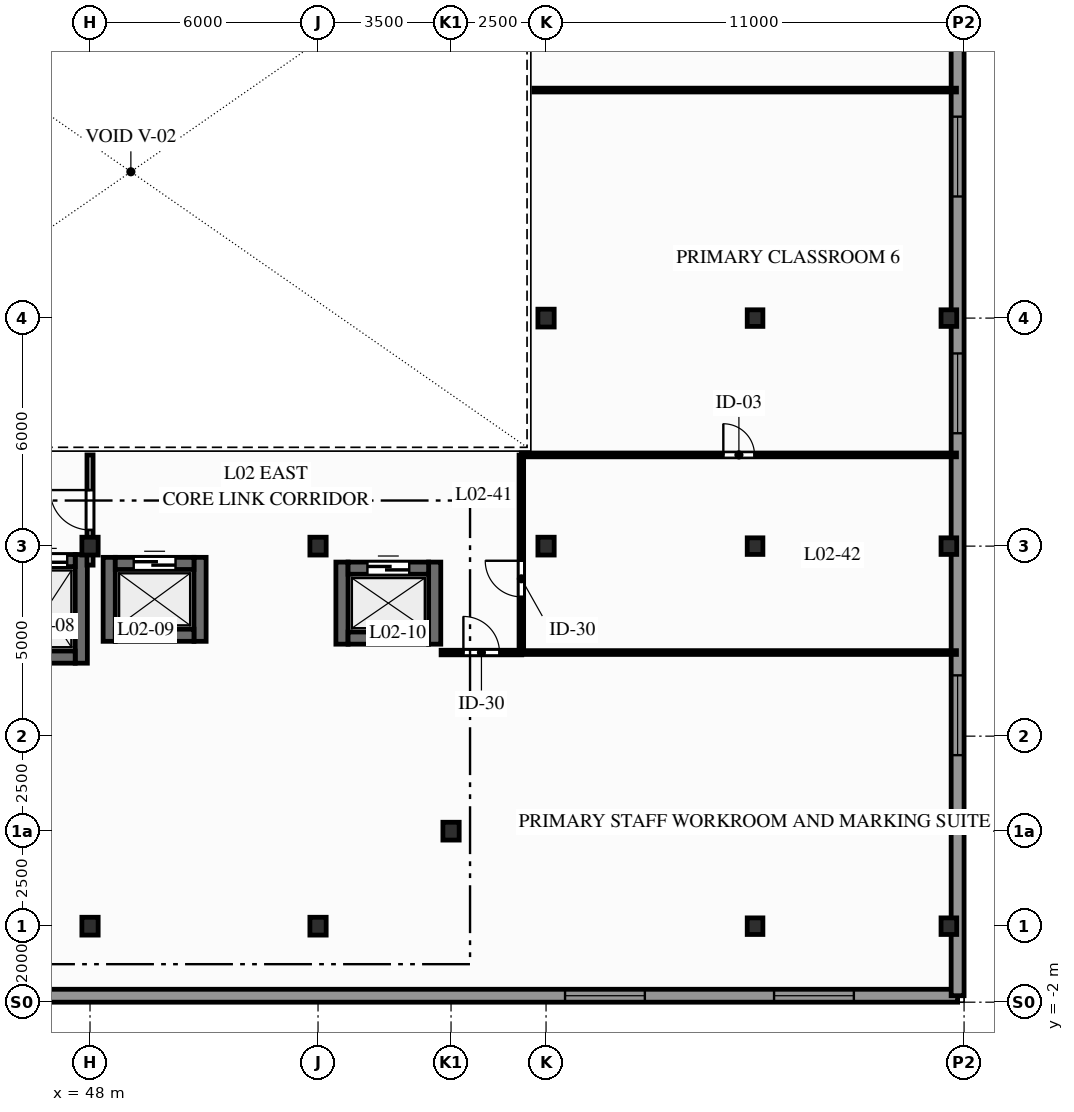
"""IFC4 building model, lengths in metres.
Left out: names, types, materials, properties, quantities, classifications, styles, units other than length and angle.
Written with IfcOpenShell. Run it as: python <this file> out.ifc"""

import sys

from ifc_helpers import new_model, si_unit, direction, frame, frame_2d, origin, origin_2d, place, context, subcontext, project, spatial, rectangle, i_section, extrude, element, fill, save


model = new_model("IFC4")
c1 = context("Model", 3, precision=1e-05, world=origin(), true_north=direction((0.0, 1.0)))
c2 = subcontext(c1, "Body", "Model", "MODEL_VIEW")
j1 = project(units=[si_unit("LENGTHUNIT", "METRE"), si_unit("PLANEANGLEUNIT", "RADIAN")], contexts=[c1])
p1 = place(None, origin())
s1 = spatial("IfcSite", under=j1, at=p1, CompositionType="ELEMENT")
p2 = place(p1, origin())
s2 = spatial("IfcBuilding", under=s1, at=p2, CompositionType="ELEMENT")
p3 = place(p2, frame((0.0, 0.0, 9.0)))
s3 = spatial("IfcBuildingStorey", under=s2, at=p3, CompositionType="ELEMENT", Elevation=9.0)
for number, where, z_axis, x_axis in (
    (1, (48.0, 0.0, 0.0), (0.0, 0.0, 1.0), (1.0, 0.0, 0.0)),
    (2, (48.0, 10.0, 0.0), (0.0, 0.0, 1.0), (1.0, 0.0, 0.0)),
    (3, (54.0, 0.0, 0.0), (0.0, 0.0, 1.0), (1.0, 0.0, 0.0)),
    (4, (54.0, 10.0, 0.0), (0.0, 0.0, 1.0), (1.0, 0.0, 0.0)),
    (5, (57.5, 2.5, 0.0), (0.0, 0.0, 1.0), (1.0, 0.0, 0.0)),
    (6, (60.0, 10.0, 0.0), (0.0, 0.0, 1.0), (1.0, 0.0, 0.0)),
    (7, (60.0, 16.0, 0.0), (0.0, 0.0, 1.0), (1.0, 0.0, 0.0)),
):
    element("IfcColumn", number, at=place(p3, frame(where, z_axis=z_axis, x_axis=x_axis)), inside=s3, PredefinedType="COLUMN", context=c2, shape_type="SweptSolid", body=[
        extrude(i_section(OverallWidth=0.428, OverallDepth=0.469, WebThickness=0.078, FlangeThickness=0.125, FilletRadius=0.015, at=origin_2d()), origin(), (0.0, 0.0, 1.0), 4.5),
    ])
for number, where, z_axis, x_axis in (
    (8, (65.5, 0.0, 0.0), (0.0, 0.0, 1.0), (1.0, 0.0, 0.0)),
    (9, (65.5, 10.0, 0.0), (0.0, 0.0, 1.0), (1.0, 0.0, 0.0)),
    (10, (65.5, 16.0, 0.0), (0.0, 0.0, 1.0), (1.0, 0.0, 0.0)),
    (11, (70.6, 0.0, 0.0), (0.0, 0.0, 1.0), (1.0, 0.0, 0.0)),
    (12, (70.6, 10.0, 0.0), (0.0, 0.0, 1.0), (1.0, 0.0, 0.0)),
    (13, (70.6, 16.0, 0.0), (0.0, 0.0, 1.0), (1.0, 0.0, 0.0)),
):
    element("IfcColumn", number, at=place(p3, frame(where, z_axis=z_axis, x_axis=x_axis)), inside=s3, PredefinedType="COLUMN", context=c2, shape_type="SweptSolid", body=[
        extrude(i_section(OverallWidth=0.412, OverallDepth=0.437, WebThickness=0.036, FlangeThickness=0.058, FilletRadius=0.015, at=origin_2d()), origin(), (0.0, 0.0, 1.0), 4.5),
    ])
p4 = place(p3, frame((-10.83, -1.83, 0.0), z_axis=(0.0, 0.0, 1.0), x_axis=(1.0, 0.0, 0.0)))
e14 = element("IfcWall", 14, at=p4, inside=s3, PredefinedType="STANDARD", context=c2, shape_type="SweptSolid", body=[
    extrude(rectangle(XDim=81.66, YDim=0.34, at=frame_2d((40.83, 0.0))), origin(), (0.0, 0.0, 1.0), 4.22),
])
p5 = place(p4, frame((2.83, 0.0, 0.9)))
e15 = element("IfcOpeningElement", 15, at=p5, cuts=e14, PredefinedType="OPENING", context=c2, shape_type="SweptSolid", body=[
    extrude(rectangle(XDim=2.1, YDim=2.05, at=frame_2d((1.05, 1.025))), frame((0.0, 0.18, 0.0), z_axis=(0.0, -1.0, 0.0), x_axis=(1.0, 0.0, 0.0)), (0.0, 0.0, 1.0), 0.36),
])
p6 = place(p4, frame((8.33, 0.0, 0.9)))
e16 = element("IfcOpeningElement", 16, at=p6, cuts=e14, PredefinedType="OPENING", context=c2, shape_type="SweptSolid", body=[
    extrude(rectangle(XDim=2.1, YDim=2.05, at=frame_2d((1.05, 1.025))), frame((0.0, 0.18, 0.0), z_axis=(0.0, -1.0, 0.0), x_axis=(1.0, 0.0, 0.0)), (0.0, 0.0, 1.0), 0.36),
])
p7 = place(p4, frame((71.33, 0.0, 0.9)))
e17 = element("IfcOpeningElement", 17, at=p7, cuts=e14, PredefinedType="OPENING", context=c2, shape_type="SweptSolid", body=[
    extrude(rectangle(XDim=2.1, YDim=2.05, at=frame_2d((1.05, 1.025))), frame((0.0, 0.18, 0.0), z_axis=(0.0, -1.0, 0.0), x_axis=(1.0, 0.0, 0.0)), (0.0, 0.0, 1.0), 0.36),
])
p8 = place(p4, frame((76.83, 0.0, 0.9)))
e18 = element("IfcOpeningElement", 18, at=p8, cuts=e14, PredefinedType="OPENING", context=c2, shape_type="SweptSolid", body=[
    extrude(rectangle(XDim=2.1, YDim=2.05, at=frame_2d((1.05, 1.025))), frame((0.0, 0.18, 0.0), z_axis=(0.0, -1.0, 0.0), x_axis=(1.0, 0.0, 0.0)), (0.0, 0.0, 1.0), 0.36),
])
p9 = place(p3, frame((70.83, -1.83, 0.0), z_axis=(0.0, 0.0, 1.0), x_axis=(0.0, 1.0, 0.0)))
e19 = element("IfcWall", 19, at=p9, inside=s3, PredefinedType="STANDARD", context=c2, shape_type="SweptSolid", body=[
    extrude(rectangle(XDim=36.43, YDim=0.34, at=frame_2d((18.215, 0.0))), origin(), (0.0, 0.0, 1.0), 3.583),
])
p10 = place(p9, frame((6.33, 0.0, 0.9)))
e20 = element("IfcOpeningElement", 20, at=p10, cuts=e19, PredefinedType="OPENING", context=c2, shape_type="SweptSolid", body=[
    extrude(rectangle(XDim=2.1, YDim=2.05, at=frame_2d((1.05, 1.025))), frame((0.0, 0.18, 0.0), z_axis=(0.0, -1.0, 0.0), x_axis=(1.0, 0.0, 0.0)), (0.0, 0.0, 1.0), 0.36),
])
p11 = place(p9, frame((14.8, 0.0, 0.9)))
e21 = element("IfcOpeningElement", 21, at=p11, cuts=e19, PredefinedType="OPENING", context=c2, shape_type="SweptSolid", body=[
    extrude(rectangle(XDim=2.1, YDim=2.05, at=frame_2d((1.05, 1.025))), frame((0.0, 0.18, 0.0), z_axis=(0.0, -1.0, 0.0), x_axis=(1.0, 0.0, 0.0)), (0.0, 0.0, 1.0), 0.36),
])
p12 = place(p9, frame((21.03, 0.0, 0.9)))
e22 = element("IfcOpeningElement", 22, at=p12, cuts=e19, PredefinedType="OPENING", context=c2, shape_type="SweptSolid", body=[
    extrude(rectangle(XDim=2.1, YDim=2.05, at=frame_2d((1.05, 1.025))), frame((0.0, 0.18, 0.0), z_axis=(0.0, -1.0, 0.0), x_axis=(1.0, 0.0, 0.0)), (0.0, 0.0, 1.0), 0.36),
])
p13 = place(p9, frame((28.63, 0.0, 0.9)))
e23 = element("IfcOpeningElement", 23, at=p13, cuts=e19, PredefinedType="OPENING", context=c2, shape_type="SweptSolid", body=[
    extrude(rectangle(XDim=2.1, YDim=2.05, at=frame_2d((1.05, 1.025))), frame((0.0, 0.18, 0.0), z_axis=(0.0, -1.0, 0.0), x_axis=(1.0, 0.0, 0.0)), (0.0, 0.0, 1.0), 0.36),
])
p14 = place(p3, frame((47.77, 6.92, 0.0), z_axis=(0.0, 0.0, 1.0), x_axis=(0.0, 1.0, 0.0)))
e24 = element("IfcWall", 24, at=p14, inside=s3, PredefinedType="SHEAR", context=c2, shape_type="SweptSolid", body=[
    extrude(rectangle(XDim=2.86, YDim=0.32, at=frame_2d((1.43, 0.0))), origin(), (0.0, 0.0, 1.0), 4.22),
])
p15 = place(p3, frame((46.09, 7.08, 0.0), z_axis=(0.0, 0.0, 1.0), x_axis=(1.0, 0.0, 0.0)))
e25 = element("IfcWall", 25, at=p15, inside=s3, PredefinedType="SHEAR", context=c2, shape_type="SweptSolid", body=[
    extrude(rectangle(XDim=1.52, YDim=0.32, at=frame_2d((0.76, 0.0))), origin(), (0.0, 0.0, 1.0), 4.22),
])
p16 = place(p3, frame((46.09, 9.62, 0.0), z_axis=(0.0, 0.0, 1.0), x_axis=(1.0, 0.0, 0.0)))
e26 = element("IfcWall", 26, at=p16, inside=s3, PredefinedType="SHEAR", context=c2, shape_type="SweptSolid", body=[
    extrude(rectangle(XDim=1.52, YDim=0.32, at=frame_2d((0.76, 0.0))), origin(), (0.0, 0.0, 1.0), 4.22),
])
p17 = place(p16, frame((0.21, 0.0, 0.0)))
e27 = element("IfcOpeningElement", 27, at=p17, cuts=e26, PredefinedType="OPENING", context=c2, shape_type="SweptSolid", body=[
    extrude(rectangle(XDim=1.1, YDim=2.06, at=frame_2d((0.55, 1.03))), frame((0.0, 0.17, 0.0), z_axis=(0.0, -1.0, 0.0), x_axis=(1.0, 0.0, 0.0)), (0.0, 0.0, 1.0), 0.34),
])
for number, where, z_axis, x_axis in (
    (28, (48.505, 7.495, 0.0), (0.0, 0.0, 1.0), (0.0, 1.0, 0.0)),
    (29, (50.895, 7.495, 0.0), (0.0, 0.0, 1.0), (0.0, 1.0, 0.0)),
):
    element("IfcWall", number, at=place(p3, frame(where, z_axis=z_axis, x_axis=x_axis)), inside=s3, PredefinedType="SHEAR", context=c2, shape_type="SweptSolid", body=[
        extrude(rectangle(XDim=2.21, YDim=0.32, at=frame_2d((1.105, 0.0))), origin(), (0.0, 0.0, 1.0), 4.22),
    ])
p18 = place(p3, frame((48.665, 7.655, 0.0), z_axis=(0.0, 0.0, 1.0), x_axis=(1.0, 0.0, 0.0)))
e30 = element("IfcWall", 30, at=p18, inside=s3, PredefinedType="SHEAR", context=c2, shape_type="SweptSolid", body=[
    extrude(rectangle(XDim=2.07, YDim=0.32, at=frame_2d((1.035, 0.0))), origin(), (0.0, 0.0, 1.0), 4.22),
])
p19 = place(p3, frame((48.665, 9.545, 0.0), z_axis=(0.0, 0.0, 1.0), x_axis=(1.0, 0.0, 0.0)))
e31 = element("IfcWall", 31, at=p19, inside=s3, PredefinedType="SHEAR", context=c2, shape_type="SweptSolid", body=[
    extrude(rectangle(XDim=2.07, YDim=0.32, at=frame_2d((1.035, 0.0))), origin(), (0.0, 0.0, 1.0), 4.22),
])
p20 = place(p19, frame((0.485, 0.0, 0.0)))
e32 = element("IfcOpeningElement", 32, at=p20, cuts=e31, PredefinedType="OPENING", context=c2, shape_type="SweptSolid", body=[
    extrude(rectangle(XDim=1.1, YDim=2.06, at=frame_2d((0.55, 1.03))), frame((0.0, 0.17, 0.0), z_axis=(0.0, -1.0, 0.0), x_axis=(1.0, 0.0, 0.0)), (0.0, 0.0, 1.0), 0.34),
])
for number, where, z_axis, x_axis in (
    (33, (54.63, 7.42, 0.0), (0.0, 0.0, 1.0), (0.0, 1.0, 0.0)),
    (34, (57.07, 7.42, 0.0), (0.0, 0.0, 1.0), (0.0, 1.0, 0.0)),
):
    element("IfcWall", number, at=place(p3, frame(where, z_axis=z_axis, x_axis=x_axis)), inside=s3, PredefinedType="SHEAR", context=c2, shape_type="SweptSolid", body=[
        extrude(rectangle(XDim=2.16, YDim=0.32, at=frame_2d((1.08, 0.0))), origin(), (0.0, 0.0, 1.0), 4.22),
    ])
p21 = place(p3, frame((54.79, 7.58, 0.0), z_axis=(0.0, 0.0, 1.0), x_axis=(1.0, 0.0, 0.0)))
e35 = element("IfcWall", 35, at=p21, inside=s3, PredefinedType="SHEAR", context=c2, shape_type="SweptSolid", body=[
    extrude(rectangle(XDim=2.12, YDim=0.32, at=frame_2d((1.06, 0.0))), origin(), (0.0, 0.0, 1.0), 4.22),
])
p22 = place(p3, frame((54.79, 9.42, 0.0), z_axis=(0.0, 0.0, 1.0), x_axis=(1.0, 0.0, 0.0)))
e36 = element("IfcWall", 36, at=p22, inside=s3, PredefinedType="SHEAR", context=c2, shape_type="SweptSolid", body=[
    extrude(rectangle(XDim=2.12, YDim=0.32, at=frame_2d((1.06, 0.0))), origin(), (0.0, 0.0, 1.0), 4.22),
])
p23 = place(p22, frame((0.51, 0.0, 0.0)))
e37 = element("IfcOpeningElement", 37, at=p23, cuts=e36, PredefinedType="OPENING", context=c2, shape_type="SweptSolid", body=[
    extrude(rectangle(XDim=1.1, YDim=2.06, at=frame_2d((0.55, 1.03))), frame((0.0, 0.17, 0.0), z_axis=(0.0, -1.0, 0.0), x_axis=(1.0, 0.0, 0.0)), (0.0, 0.0, 1.0), 0.34),
])
p24 = place(p3, frame((48.0, 9.5, 0.0), z_axis=(0.0, 0.0, 1.0), x_axis=(0.0, 1.0, 0.0)))
e38 = element("IfcWall", 38, at=p24, inside=s3, PredefinedType="PARTITIONING", context=c2, shape_type="SweptSolid", body=[
    extrude(rectangle(XDim=2.9, YDim=0.16, at=frame_2d((1.45, 0.0))), origin(), (0.0, 0.0, 1.0), 3.344),
])
p25 = place(p24, frame((0.925, 0.0, 0.0)))
e39 = element("IfcOpeningElement", 39, at=p25, cuts=e38, PredefinedType="OPENING", context=c2, shape_type="SweptSolid", body=[
    extrude(rectangle(XDim=1.05, YDim=2.06, at=frame_2d((0.525, 1.03))), frame((0.0, 0.09, 0.0), z_axis=(0.0, -1.0, 0.0), x_axis=(1.0, 0.0, 0.0)), (0.0, 0.0, 1.0), 0.18),
])
p26 = place(p3, frame((59.68, 22.0, 0.0), z_axis=(0.0, 0.0, 1.0), x_axis=(1.0, 0.0, 0.0)))
e40 = element("IfcWall", 40, at=p26, inside=s3, PredefinedType="PARTITIONING", context=c2, shape_type="SweptSolid", body=[
    extrude(rectangle(XDim=11.12, YDim=0.1, at=frame_2d((5.56, 0.0))), origin(), (0.0, 0.0, 1.0), 3.344),
])
p27 = place(p3, frame((59.35, 12.4, 0.0), z_axis=(0.0, 0.0, 1.0), x_axis=(1.0, 0.0, 0.0)))
e41 = element("IfcWall", 41, at=p27, inside=s3, PredefinedType="PARTITIONING", context=c2, shape_type="SweptSolid", body=[
    extrude(rectangle(XDim=11.45, YDim=0.1, at=frame_2d((5.725, 0.0))), origin(), (0.0, 0.0, 1.0), 3.344),
])
p28 = place(p27, frame((5.315, 0.0, 0.0)))
e42 = element("IfcOpeningElement", 42, at=p28, cuts=e41, PredefinedType="OPENING", context=c2, shape_type="SweptSolid", body=[
    extrude(rectangle(XDim=0.82, YDim=2.02, at=frame_2d((0.41, 1.01))), frame((0.0, 0.06, 0.0), z_axis=(0.0, -1.0, 0.0), x_axis=(1.0, 0.0, 0.0)), (0.0, 0.0, 1.0), 0.12),
])
p29 = place(p3, frame((57.239, 7.2, 0.0), z_axis=(0.0, 0.0, 1.0), x_axis=(1.0, 0.0, 0.0)))
e43 = element("IfcWall", 43, at=p29, inside=s3, PredefinedType="PARTITIONING", context=c2, shape_type="SweptSolid", body=[
    extrude(rectangle(XDim=2.123, YDim=0.12, at=frame_2d((1.061, 0.0))), origin(), (0.0, 0.0, 1.0), 4.22),
])
p30 = place(p29, frame((0.586, 0.0, 0.0)))
e44 = element("IfcOpeningElement", 44, at=p30, cuts=e43, PredefinedType="OPENING", context=c2, shape_type="SweptSolid", body=[
    extrude(rectangle(XDim=0.95, YDim=2.05, at=frame_2d((0.475, 1.025))), frame((0.0, 0.07, 0.0), z_axis=(0.0, -1.0, 0.0), x_axis=(1.0, 0.0, 0.0)), (0.0, 0.0, 1.0), 0.14),
])
p31 = place(p3, frame((59.343, 7.2, 0.0), z_axis=(0.0, 0.0, 1.0), x_axis=(1.0, 0.0, 0.0)))
e45 = element("IfcWall", 45, at=p31, inside=s3, PredefinedType="PARTITIONING", context=c2, shape_type="SweptSolid", body=[
    extrude(rectangle(XDim=11.457, YDim=0.1, at=frame_2d((5.729, 0.0))), origin(), (0.0, 0.0, 1.0), 3.344),
])
p32 = place(p3, frame((59.35, 7.204, 0.0), z_axis=(0.0, 0.0, 1.0), x_axis=(0.0, 1.0, 0.0)))
e46 = element("IfcWall", 46, at=p32, inside=s3, PredefinedType="PARTITIONING", context=c2, shape_type="SweptSolid", body=[
    extrude(rectangle(XDim=5.192, YDim=0.12, at=frame_2d((2.596, 0.0))), origin(), (0.0, 0.0, 1.0), 3.344),
])
p33 = place(p32, frame((1.461, 0.0, 0.0)))
e47 = element("IfcOpeningElement", 47, at=p33, cuts=e46, PredefinedType="OPENING", context=c2, shape_type="SweptSolid", body=[
    extrude(rectangle(XDim=0.95, YDim=2.05, at=frame_2d((0.475, 1.025))), frame((0.0, 0.07, 0.0), z_axis=(0.0, -1.0, 0.0), x_axis=(1.0, 0.0, 0.0)), (0.0, 0.0, 1.0), 0.14),
])
p34 = place(p7, origin())
e48 = element("IfcWindow", 48, at=p34, inside=s3, PartitioningType="SINGLE_PANEL", PredefinedType="WINDOW", context=c2, shape_type="SweptSolid", body=[
    extrude(rectangle(XDim=2.1, YDim=2.05, at=frame_2d((1.05, 1.025))), frame((0.0, 0.03, 0.0), z_axis=(0.0, -1.0, 0.0), x_axis=(1.0, 0.0, 0.0)), (0.0, 0.0, 1.0), 0.06),
])
fill(e17, e48)
p35 = place(p8, origin())
e49 = element("IfcWindow", 49, at=p35, inside=s3, PartitioningType="SINGLE_PANEL", PredefinedType="WINDOW", context=c2, shape_type="SweptSolid", body=[
    extrude(rectangle(XDim=2.1, YDim=2.05, at=frame_2d((1.05, 1.025))), frame((0.0, 0.03, 0.0), z_axis=(0.0, -1.0, 0.0), x_axis=(1.0, 0.0, 0.0)), (0.0, 0.0, 1.0), 0.06),
])
fill(e18, e49)
p36 = place(p10, origin())
e50 = element("IfcWindow", 50, at=p36, inside=s3, PartitioningType="SINGLE_PANEL", PredefinedType="WINDOW", context=c2, shape_type="SweptSolid", body=[
    extrude(rectangle(XDim=2.1, YDim=2.05, at=frame_2d((1.05, 1.025))), frame((0.0, 0.03, 0.0), z_axis=(0.0, -1.0, 0.0), x_axis=(1.0, 0.0, 0.0)), (0.0, 0.0, 1.0), 0.06),
])
fill(e20, e50)
p37 = place(p11, origin())
e51 = element("IfcWindow", 51, at=p37, inside=s3, PartitioningType="SINGLE_PANEL", PredefinedType="WINDOW", context=c2, shape_type="SweptSolid", body=[
    extrude(rectangle(XDim=2.1, YDim=2.05, at=frame_2d((1.05, 1.025))), frame((0.0, 0.03, 0.0), z_axis=(0.0, -1.0, 0.0), x_axis=(1.0, 0.0, 0.0)), (0.0, 0.0, 1.0), 0.06),
])
fill(e21, e51)
p38 = place(p12, origin())
e52 = element("IfcWindow", 52, at=p38, inside=s3, PartitioningType="SINGLE_PANEL", PredefinedType="WINDOW", context=c2, shape_type="SweptSolid", body=[
    extrude(rectangle(XDim=2.1, YDim=2.05, at=frame_2d((1.05, 1.025))), frame((0.0, 0.03, 0.0), z_axis=(0.0, -1.0, 0.0), x_axis=(1.0, 0.0, 0.0)), (0.0, 0.0, 1.0), 0.06),
])
fill(e22, e52)
p39 = place(p17, origin())
e53 = element("IfcDoor", 53, at=p39, inside=s3, OperationType="SLIDING_TO_LEFT", PredefinedType="DOOR", context=c2, shape_type="SweptSolid", body=[
    extrude(rectangle(XDim=1.1, YDim=2.06, at=frame_2d((0.55, 1.03))), frame((0.0, 0.025, 0.0), z_axis=(0.0, -1.0, 0.0), x_axis=(1.0, 0.0, 0.0)), (0.0, 0.0, 1.0), 0.05),
])
fill(e27, e53)
p40 = place(p20, origin())
e54 = element("IfcDoor", 54, at=p40, inside=s3, OperationType="SLIDING_TO_RIGHT", PredefinedType="DOOR", context=c2, shape_type="SweptSolid", body=[
    extrude(rectangle(XDim=1.1, YDim=2.06, at=frame_2d((0.55, 1.03))), frame((0.0, 0.025, 0.0), z_axis=(0.0, -1.0, 0.0), x_axis=(1.0, 0.0, 0.0)), (0.0, 0.0, 1.0), 0.05),
])
fill(e32, e54)
p41 = place(p23, origin())
e55 = element("IfcDoor", 55, at=p41, inside=s3, OperationType="SLIDING_TO_LEFT", PredefinedType="DOOR", context=c2, shape_type="SweptSolid", body=[
    extrude(rectangle(XDim=1.1, YDim=2.06, at=frame_2d((0.55, 1.03))), frame((0.0, 0.025, 0.0), z_axis=(0.0, -1.0, 0.0), x_axis=(1.0, 0.0, 0.0)), (0.0, 0.0, 1.0), 0.05),
])
fill(e37, e55)
p42 = place(p25, origin())
e56 = element("IfcDoor", 56, at=p42, inside=s3, OperationType="SINGLE_SWING_RIGHT", PredefinedType="DOOR", context=c2, shape_type="SweptSolid", body=[
    extrude(rectangle(XDim=1.05, YDim=2.06, at=frame_2d((0.525, 1.03))), frame((0.0, 0.025, 0.0), z_axis=(0.0, -1.0, 0.0), x_axis=(1.0, 0.0, 0.0)), (0.0, 0.0, 1.0), 0.05),
])
fill(e39, e56)
p43 = place(p30, origin())
e57 = element("IfcDoor", 57, at=p43, inside=s3, OperationType="SINGLE_SWING_LEFT", PredefinedType="DOOR", context=c2, shape_type="SweptSolid", body=[
    extrude(rectangle(XDim=0.95, YDim=2.05, at=frame_2d((0.475, 1.025))), frame((0.0, 0.025, 0.0), z_axis=(0.0, -1.0, 0.0), x_axis=(1.0, 0.0, 0.0)), (0.0, 0.0, 1.0), 0.05),
])
fill(e44, e57)
p44 = place(p33, origin())
e58 = element("IfcDoor", 58, at=p44, inside=s3, OperationType="SINGLE_SWING_RIGHT", PredefinedType="DOOR", context=c2, shape_type="SweptSolid", body=[
    extrude(rectangle(XDim=0.95, YDim=2.05, at=frame_2d((0.475, 1.025))), frame((0.0, 0.025, 0.0), z_axis=(0.0, -1.0, 0.0), x_axis=(1.0, 0.0, 0.0)), (0.0, 0.0, 1.0), 0.05),
])
fill(e47, e58)
p45 = place(p28, origin())
e59 = element("IfcDoor", 59, at=p45, inside=s3, OperationType="SINGLE_SWING_LEFT", PredefinedType="DOOR", context=c2, shape_type="SweptSolid", body=[
    extrude(rectangle(XDim=0.82, YDim=2.02, at=frame_2d((0.41, 1.01))), frame((0.0, 0.025, 0.0), z_axis=(0.0, -1.0, 0.0), x_axis=(1.0, 0.0, 0.0)), (0.0, 0.0, 1.0), 0.05),
])
fill(e42, e59)
save(model, sys.argv[1])
